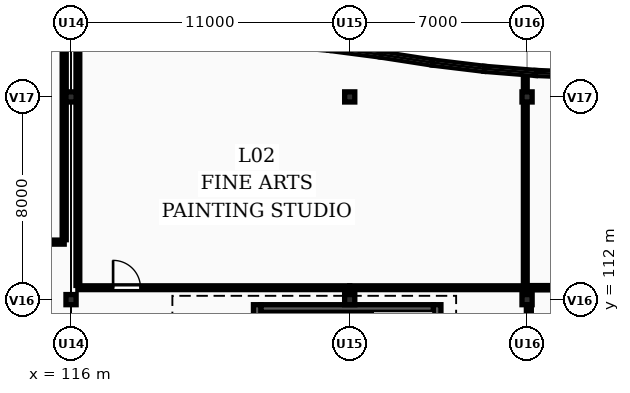
"""IFC4 building model, lengths in metres.
Left out: names, types, materials, properties, quantities, classifications, styles, units other than length and angle.
Written with IfcOpenShell. Run it as: python <this file> out.ifc"""

import sys

from ifc_helpers import new_model, si_unit, direction, frame, frame_2d, origin, origin_2d, place, context, subcontext, project, spatial, rectangle, extrude, element, fill, save


model = new_model("IFC4")
c1 = context("Model", 3, precision=1e-05, world=origin(), true_north=direction((0.0, 1.0)))
c2 = subcontext(c1, "Body", "Model", "MODEL_VIEW")
j1 = project(units=[si_unit("LENGTHUNIT", "METRE"), si_unit("PLANEANGLEUNIT", "RADIAN")], contexts=[c1])
p1 = place(None, origin())
s1 = spatial("IfcSite", under=j1, at=p1, CompositionType="ELEMENT")
p2 = place(p1, origin())
s2 = spatial("IfcBuilding", under=s1, at=p2, CompositionType="ELEMENT")
p3 = place(p2, frame((0.0, 0.0, 8.4)))
s3 = spatial("IfcBuildingStorey", under=s2, at=p3, CompositionType="ELEMENT", Elevation=8.4)
for number, where, z_axis, x_axis in (
    (1, (116.0, 112.0, 0.0), (0.0, 0.0, 1.0), (1.0, 0.0, 0.0)),
    (2, (116.0, 120.0, 0.0), (0.0, 0.0, 1.0), (1.0, 0.0, 0.0)),
    (3, (127.0, 112.0, 0.0), (0.0, 0.0, 1.0), (1.0, 0.0, 0.0)),
    (4, (127.0, 120.0, 0.0), (0.0, 0.0, 1.0), (1.0, 0.0, 0.0)),
    (5, (134.0, 112.0, 0.0), (0.0, 0.0, 1.0), (1.0, 0.0, 0.0)),
    (6, (134.0, 120.0, 0.0), (0.0, 0.0, 1.0), (1.0, 0.0, 0.0)),
):
    element("IfcColumn", number, at=place(p3, frame(where, z_axis=z_axis, x_axis=x_axis)), inside=s3, PredefinedType="COLUMN", context=c2, shape_type="SweptSolid", body=[
        extrude(rectangle(XDim=0.4, YDim=0.4, at=origin_2d()), origin(), (0.0, 0.0, 1.0), 3.9),
    ])
p4 = place(p3, frame((114.0, 121.842, 0.0), z_axis=(0.0, 0.0, 1.0), x_axis=(0.994395160059, 0.105727317433, 0.0)))
e7 = element("IfcWall", 7, at=p4, inside=s3, PredefinedType="SOLIDWALL", context=c2, shape_type="SweptSolid", body=[
    extrude(rectangle(XDim=2.011, YDim=0.2, at=frame_2d((1.006, 0.0))), origin(), (0.0, 0.0, 1.0), 0.95),
])
p5 = place(p3, frame((126.192, 121.937, 0.0), z_axis=(0.0, 0.0, 1.0), x_axis=(0.991615636968, -0.129222399452, 0.0)))
e8 = element("IfcWall", 8, at=p5, inside=s3, PredefinedType="SOLIDWALL", context=c2, shape_type="SweptSolid", body=[
    extrude(rectangle(XDim=2.056, YDim=0.2, at=frame_2d((1.028, 0.0))), origin(), (0.0, 0.0, 1.0), 0.95),
])
p6 = place(p3, frame((128.231, 121.671, 0.0), z_axis=(0.0, 0.0, 1.0), x_axis=(0.988222087659, -0.153026486149, 0.0)))
e9 = element("IfcWall", 9, at=p6, inside=s3, PredefinedType="SOLIDWALL", context=c2, shape_type="SweptSolid", body=[
    extrude(rectangle(XDim=2.063, YDim=0.2, at=frame_2d((1.031, 0.0))), origin(), (0.0, 0.0, 1.0), 0.95),
])
p7 = place(p3, frame((130.269, 121.356, 0.0), z_axis=(0.0, 0.0, 1.0), x_axis=(0.99284698408, -0.119393744403, 0.0)))
e10 = element("IfcWall", 10, at=p7, inside=s3, PredefinedType="SOLIDWALL", context=c2, shape_type="SweptSolid", body=[
    extrude(rectangle(XDim=2.053, YDim=0.2, at=frame_2d((1.026, 0.0))), origin(), (0.0, 0.0, 1.0), 0.95),
])
p8 = place(p3, frame((132.308, 121.111, 0.0), z_axis=(0.0, 0.0, 1.0), x_axis=(0.996767656411, -0.080338279373, 0.0)))
e11 = element("IfcWall", 11, at=p8, inside=s3, PredefinedType="SOLIDWALL", context=c2, shape_type="SweptSolid", body=[
    extrude(rectangle(XDim=2.045, YDim=0.2, at=frame_2d((1.022, 0.0))), origin(), (0.0, 0.0, 1.0), 0.95),
])
p9 = place(p3, frame((134.346, 120.946, 0.0), z_axis=(0.0, 0.0, 1.0), x_axis=(0.999157169977, -0.041048138616, 0.0)))
e12 = element("IfcWall", 12, at=p9, inside=s3, PredefinedType="SOLIDWALL", context=c2, shape_type="SweptSolid", body=[
    extrude(rectangle(XDim=2.04, YDim=0.2, at=frame_2d((1.02, 0.0))), origin(), (0.0, 0.0, 1.0), 0.95),
])
for number, where, z_axis, x_axis in (
    (13, (123.35, 107.7, 0.0), (0.0, 0.0, 1.0), (0.0, 1.0, 0.0)),
    (14, (130.45, 111.8, 0.0), (0.0, 0.0, 1.0), (0.0, -1.0, 0.0)),
):
    element("IfcWall", number, at=place(p3, frame(where, z_axis=z_axis, x_axis=x_axis)), inside=s3, PredefinedType="SHEAR", context=c2, shape_type="SweptSolid", body=[
        extrude(rectangle(XDim=4.1, YDim=0.3, at=frame_2d((2.05, 0.0))), origin(), (0.0, 0.0, 1.0), 3.65),
    ])
p10 = place(p3, frame((130.3, 111.65, 0.0), z_axis=(0.0, 0.0, 1.0), x_axis=(-1.0, 0.0, 0.0)))
e15 = element("IfcWall", 15, at=p10, inside=s3, PredefinedType="SHEAR", context=c2, shape_type="SweptSolid", body=[
    extrude(rectangle(XDim=6.8, YDim=0.3, at=frame_2d((3.4, 0.0))), origin(), (0.0, 0.0, 1.0), 3.65),
])
p11 = place(p3, frame((107.07, 114.27, 0.0), z_axis=(0.0, 0.0, 1.0), x_axis=(1.0, 0.0, 0.0)))
e16 = element("IfcWall", 16, at=p11, inside=s3, PredefinedType="PARTITIONING", context=c2, shape_type="SweptSolid", body=[
    extrude(rectangle(XDim=8.66, YDim=0.16, at=frame_2d((4.33, 0.0))), origin(), (0.0, 0.0, 1.0), 3.65),
])
p12 = place(p11, frame((3.93, 0.0, 0.0)))
e17 = element("IfcOpeningElement", 17, at=p12, cuts=e16, PredefinedType="OPENING", context=c2, shape_type="SweptSolid", body=[
    extrude(rectangle(XDim=1.0, YDim=2.15, at=frame_2d((0.5, 1.075))), frame((0.0, 0.09, 0.0), z_axis=(0.0, -1.0, 0.0), x_axis=(1.0, 0.0, 0.0)), (0.0, 0.0, 1.0), 0.18),
])
p13 = place(p3, frame((115.73, 114.365, 0.0), z_axis=(0.0, 0.0, 1.0), x_axis=(0.0, 1.0, 0.0)))
e18 = element("IfcWall", 18, at=p13, inside=s3, PredefinedType="PARTITIONING", context=c2, shape_type="SweptSolid", body=[
    extrude(rectangle(XDim=7.519, YDim=0.16, at=frame_2d((3.759, 0.0))), origin(), (0.0, 0.0, 1.0), 3.085),
])
p14 = place(p3, frame((116.27, 112.47, 0.0), z_axis=(0.0, 0.0, 1.0), x_axis=(1.0, 0.0, 0.0)))
e19 = element("IfcWall", 19, at=p14, inside=s3, PredefinedType="PARTITIONING", context=c2, shape_type="SweptSolid", body=[
    extrude(rectangle(XDim=10.73, YDim=0.15, at=frame_2d((5.365, 0.0))), origin(), (0.0, 0.0, 1.0), 3.65),
])
p15 = place(p14, frame((1.39, 0.0, 0.0)))
e20 = element("IfcOpeningElement", 20, at=p15, cuts=e19, PredefinedType="OPENING", context=c2, shape_type="SweptSolid", body=[
    extrude(rectangle(XDim=1.08, YDim=2.15, at=frame_2d((0.54, 1.075))), frame((0.0, 0.085, 0.0), z_axis=(0.0, -1.0, 0.0), x_axis=(1.0, 0.0, 0.0)), (0.0, 0.0, 1.0), 0.17),
])
p16 = place(p3, frame((127.0, 112.47, 0.0), z_axis=(0.0, 0.0, 1.0), x_axis=(1.0, 0.0, 0.0)))
e21 = element("IfcWall", 21, at=p16, inside=s3, PredefinedType="PARTITIONING", context=c2, shape_type="SweptSolid", body=[
    extrude(rectangle(XDim=6.93, YDim=0.15, at=frame_2d((3.465, 0.0))), origin(), (0.0, 0.0, 1.0), 3.65),
])
p17 = place(p3, frame((116.27, 112.56, 0.0), z_axis=(0.0, 0.0, 1.0), x_axis=(0.0, 1.0, 0.0)))
e22 = element("IfcWall", 22, at=p17, inside=s3, PredefinedType="PARTITIONING", context=c2, shape_type="SweptSolid", body=[
    extrude(rectangle(XDim=9.37, YDim=0.15, at=frame_2d((4.685, 0.0))), origin(), (0.0, 0.0, 1.0), 3.085),
])
p18 = place(p3, frame((133.93, 112.56, 0.0), z_axis=(0.0, 0.0, 1.0), x_axis=(0.0, 1.0, 0.0)))
e23 = element("IfcWall", 23, at=p18, inside=s3, PredefinedType="PARTITIONING", context=c2, shape_type="SweptSolid", body=[
    extrude(rectangle(XDim=8.278, YDim=0.15, at=frame_2d((4.139, 0.0))), origin(), (0.0, 0.0, 1.0), 3.085),
])
p19 = place(p3, frame((134.07, 112.47, 0.0), z_axis=(0.0, 0.0, 1.0), x_axis=(1.0, 0.0, 0.0)))
e24 = element("IfcWall", 24, at=p19, inside=s3, PredefinedType="PARTITIONING", context=c2, shape_type="SweptSolid", body=[
    extrude(rectangle(XDim=6.93, YDim=0.17, at=frame_2d((3.465, 0.0))), origin(), (0.0, 0.0, 1.0), 3.65),
])
p20 = place(p19, frame((2.87, 0.0, 0.0)))
e25 = element("IfcOpeningElement", 25, at=p20, cuts=e24, PredefinedType="OPENING", context=c2, shape_type="SweptSolid", body=[
    extrude(rectangle(XDim=1.12, YDim=2.15, at=frame_2d((0.56, 1.075))), frame((0.0, 0.095, 0.0), z_axis=(0.0, -1.0, 0.0), x_axis=(1.0, 0.0, 0.0)), (0.0, 0.0, 1.0), 0.19),
])
p21 = place(p3, frame((134.07, 107.782, 0.0), z_axis=(0.0, 0.0, 1.0), x_axis=(0.0, 1.0, 0.0)))
e26 = element("IfcWall", 26, at=p21, inside=s3, PredefinedType="PARTITIONING", context=c2, shape_type="SweptSolid", body=[
    extrude(rectangle(XDim=4.548, YDim=0.195, at=frame_2d((2.274, 0.0))), origin(), (0.0, 0.0, 1.0), 3.085),
])
p22 = place(p15, origin())
e27 = element("IfcDoor", 27, at=p22, inside=s3, OperationType="SINGLE_SWING_LEFT", PredefinedType="DOOR", context=c2, shape_type="SweptSolid", body=[
    extrude(rectangle(XDim=1.08, YDim=2.15, at=frame_2d((0.54, 1.075))), frame((0.0, 0.025, 0.0), z_axis=(0.0, -1.0, 0.0), x_axis=(1.0, 0.0, 0.0)), (0.0, 0.0, 1.0), 0.05),
])
fill(e20, e27)
save(model, sys.argv[1])
